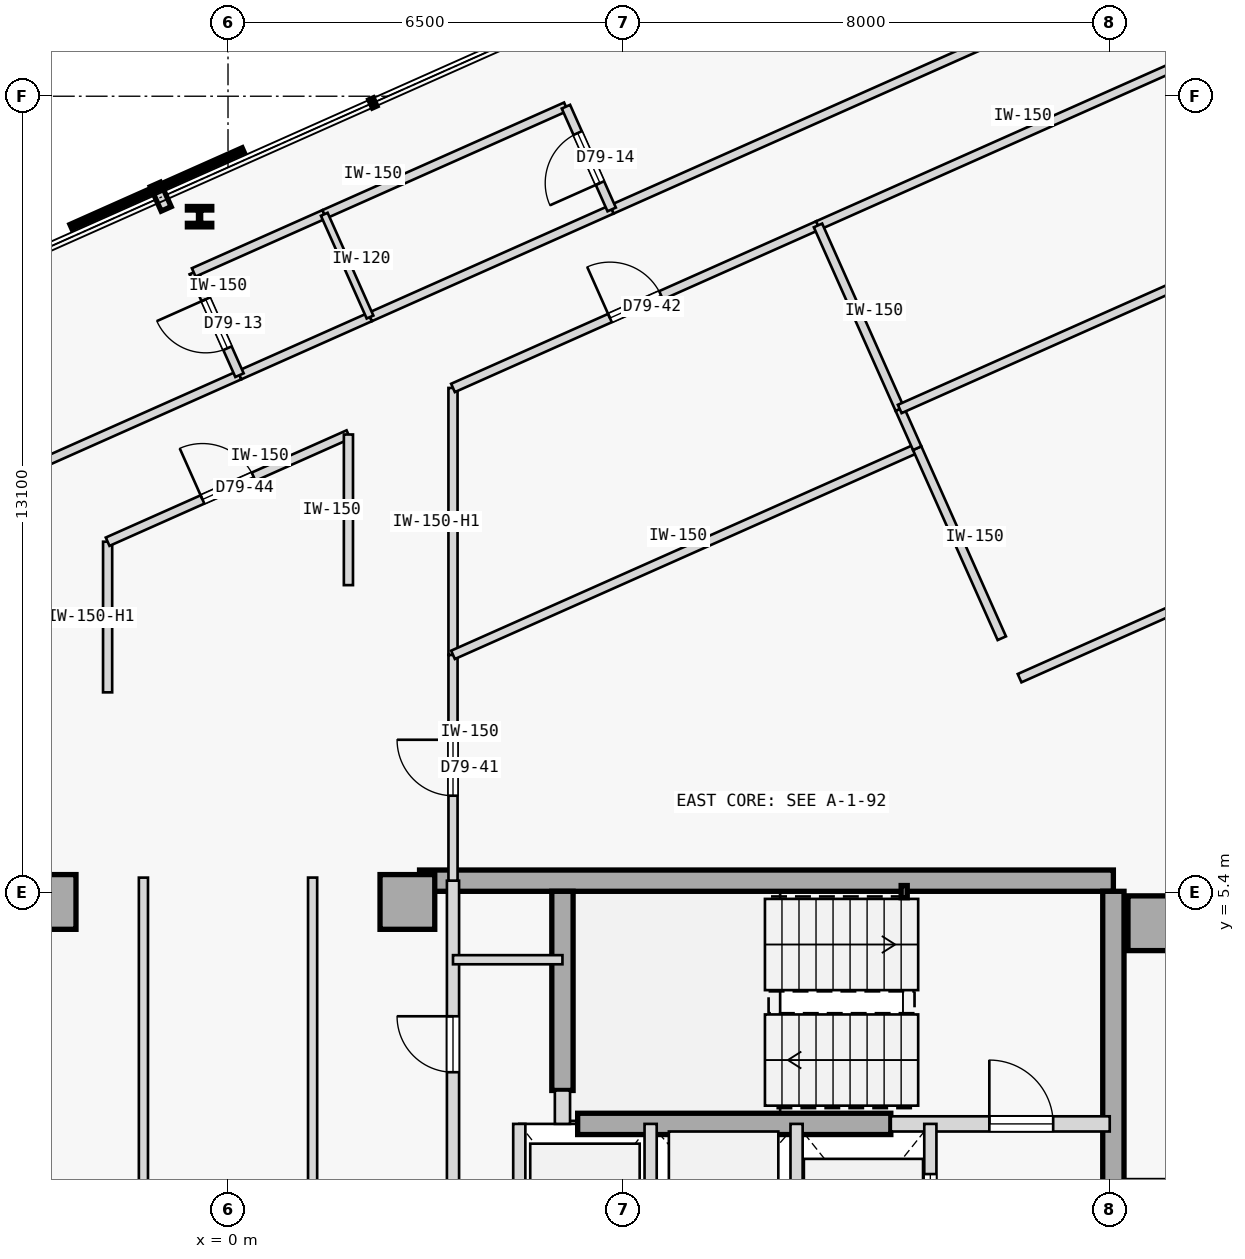
"""IFC4 building model, lengths in metres.
Left out: names, types, materials, properties, quantities, classifications, styles, units other than length and angle.
Written with IfcOpenShell. Run it as: python <this file> out.ifc"""

import sys

from ifc_helpers import new_model, si_unit, direction, frame, frame_2d, origin, origin_2d, place, context, subcontext, project, spatial, rectangle, hollow_rectangle, i_section, extrude, element, fill, save


model = new_model("IFC4")
c1 = context("Model", 3, precision=1e-05, world=origin(), true_north=direction((0.0, 1.0)))
c2 = subcontext(c1, "Body", "Model", "MODEL_VIEW")
j1 = project(units=[si_unit("LENGTHUNIT", "METRE"), si_unit("PLANEANGLEUNIT", "RADIAN")], contexts=[c1])
p1 = place(None, origin())
s1 = spatial("IfcSite", under=j1, at=p1, CompositionType="ELEMENT")
p2 = place(p1, origin())
s2 = spatial("IfcBuilding", under=s1, at=p2, CompositionType="ELEMENT")
p3 = place(p2, frame((0.0, 0.0, 295.3)))
s3 = spatial("IfcBuildingStorey", under=s2, at=p3, CompositionType="ELEMENT", Elevation=295.3)
for number, where, z_axis, x_axis in (
    (1, (-2.95, 5.25, 0.0), (0.0, 0.0, 1.0), (1.0, 0.0, 0.0)),
    (2, (15.25, 4.9, 0.0), (0.0, 0.0, 1.0), (1.0, 0.0, 0.0)),
    (3, (2.95, 5.25, 0.0), (0.0, 0.0, 1.0), (1.0, 0.0, 0.0)),
):
    element("IfcColumn", number, at=place(p3, frame(where, z_axis=z_axis, x_axis=x_axis)), inside=s3, PredefinedType="COLUMN", context=c2, shape_type="SweptSolid", body=[
        extrude(rectangle(XDim=0.9, YDim=0.9, at=origin_2d()), origin(), (0.0, 0.0, 1.0), 3.35),
    ])
p4 = place(p3, frame((3.15, 5.6, 0.0), z_axis=(0.0, 0.0, 1.0), x_axis=(1.0, 0.0, 0.0)))
e4 = element("IfcWall", 4, at=p4, inside=s3, PredefinedType="SHEAR", context=c2, shape_type="SweptSolid", body=[
    extrude(rectangle(XDim=11.41, YDim=0.35, at=frame_2d((5.705, 0.0))), origin(), (0.0, 0.0, 1.0), 3.125),
])
p5 = place(p3, frame((14.56, -5.425, 0.0), z_axis=(0.0, 0.0, 1.0), x_axis=(0.0, 1.0, 0.0)))
e5 = element("IfcWall", 5, at=p5, inside=s3, PredefinedType="SHEAR", context=c2, shape_type="SweptSolid", body=[
    extrude(rectangle(XDim=10.85, YDim=0.35, at=frame_2d((5.425, 0.0))), origin(), (0.0, 0.0, 1.0), 3.125),
])
p6 = place(p3, frame((5.5, 2.15, 0.0), z_axis=(0.0, 0.0, 1.0), x_axis=(0.0, 1.0, 0.0)))
e6 = element("IfcWall", 6, at=p6, inside=s3, PredefinedType="SHEAR", context=c2, shape_type="SweptSolid", body=[
    extrude(rectangle(XDim=3.275, YDim=0.35, at=frame_2d((1.638, 0.0))), origin(), (0.0, 0.0, 1.0), 3.125),
])
p7 = place(p3, frame((5.75, 1.6, 0.0), z_axis=(0.0, 0.0, 1.0), x_axis=(1.0, 0.0, 0.0)))
e7 = element("IfcWall", 7, at=p7, inside=s3, PredefinedType="SHEAR", context=c2, shape_type="SweptSolid", body=[
    extrude(rectangle(XDim=5.15, YDim=0.35, at=frame_2d((2.575, 0.0))), origin(), (0.0, 0.0, 1.0), 3.125),
])
p8 = place(p3, frame((11.12, 5.42, 0.0), z_axis=(0.0, 0.0, 1.0), x_axis=(1.0, 0.0, 0.0)))
e8 = element("IfcColumn", 8, at=p8, inside=s3, PredefinedType="COLUMN", context=c2, shape_type="SweptSolid", body=[
    extrude(hollow_rectangle(XDim=0.1, YDim=0.2, WallThickness=0.008, at=origin_2d()), origin(), (0.0, 0.0, 1.0), 3.35),
])
p9 = place(p3, frame((-0.468, 16.519, 0.0), z_axis=(0.0, 0.0, 1.0), x_axis=(1.0, 0.0, 0.0)))
e9 = element("IfcColumn", 9, at=p9, inside=s3, PredefinedType="COLUMN", context=c2, shape_type="SweptSolid", body=[
    extrude(i_section(OverallWidth=0.401, OverallDepth=0.335, WebThickness=0.036, FlangeThickness=0.058, FilletRadius=0.015, at=origin_2d()), origin(), (0.0, 0.0, 1.0), 3.35),
])
p10 = place(p3, frame((10.9, 1.6, 0.0), z_axis=(0.0, 0.0, 1.0), x_axis=(1.0, 0.0, 0.0)))
e10 = element("IfcWall", 10, at=p10, inside=s3, PredefinedType="STANDARD", context=c2, shape_type="SweptSolid", body=[
    extrude(rectangle(XDim=3.6, YDim=0.25, at=frame_2d((1.8, 0.0))), origin(), (0.0, 0.0, 1.0), 3.125),
])
p11 = place(p10, frame((1.62, 0.0, 0.0)))
e11 = element("IfcOpeningElement", 11, at=p11, cuts=e10, PredefinedType="OPENING", context=c2, shape_type="SweptSolid", body=[
    extrude(rectangle(XDim=1.05, YDim=2.15, at=frame_2d((0.525, 1.075))), frame((0.0, 0.135, 0.0), z_axis=(0.0, -1.0, 0.0), x_axis=(1.0, 0.0, 0.0)), (0.0, 0.0, 1.0), 0.27),
])
p12 = place(p3, frame((5.5, 1.6, 0.0), z_axis=(0.0, 0.0, 1.0), x_axis=(0.0, 1.0, 0.0)))
e12 = element("IfcWall", 12, at=p12, inside=s3, PredefinedType="STANDARD", context=c2, shape_type="SweptSolid", body=[
    extrude(rectangle(XDim=0.55, YDim=0.25, at=frame_2d((0.275, 0.0))), origin(), (0.0, 0.0, 1.0), 3.125),
])
p13 = place(p3, frame((3.7, -1.15, 0.0), z_axis=(0.0, 0.0, 1.0), x_axis=(0.0, 1.0, 0.0)))
e13 = element("IfcWall", 13, at=p13, inside=s3, PredefinedType="STANDARD", context=c2, shape_type="SweptSolid", body=[
    extrude(rectangle(XDim=6.75, YDim=0.2, at=frame_2d((3.375, 0.0))), origin(), (0.0, 0.0, 1.0), 3.125),
])
p14 = place(p13, frame((3.6, 0.0, 0.0)))
e14 = element("IfcOpeningElement", 14, at=p14, cuts=e13, PredefinedType="OPENING", context=c2, shape_type="SweptSolid", body=[
    extrude(rectangle(XDim=0.92, YDim=2.15, at=frame_2d((0.46, 1.075))), frame((0.0, 0.11, 0.0), z_axis=(0.0, -1.0, 0.0), x_axis=(1.0, 0.0, 0.0)), (0.0, 0.0, 1.0), 0.22),
])
p15 = place(p3, frame((11.55, -1.15, 0.0), z_axis=(0.0, 0.0, 1.0), x_axis=(0.0, 1.0, 0.0)))
e15 = element("IfcWall", 15, at=p15, inside=s3, PredefinedType="STANDARD", context=c2, shape_type="SweptSolid", body=[
    extrude(rectangle(XDim=2.75, YDim=0.2, at=frame_2d((1.375, 0.0))), origin(), (0.0, 0.0, 1.0), 3.125),
])
p16 = place(p15, frame((0.825, 0.0, 0.0)))
e16 = element("IfcOpeningElement", 16, at=p16, cuts=e15, PredefinedType="OPENING", context=c2, shape_type="SweptSolid", body=[
    extrude(rectangle(XDim=1.1, YDim=2.15, at=frame_2d((0.55, 1.075))), frame((0.0, 0.11, 0.0), z_axis=(0.0, -1.0, 0.0), x_axis=(1.0, 0.0, 0.0)), (0.0, 0.0, 1.0), 0.22),
])
for number, where, z_axis, x_axis in (
    (17, (9.35, -1.15, 0.0), (0.0, 0.0, 1.0), (0.0, 1.0, 0.0)),
    (18, (6.95, -1.15, 0.0), (0.0, 0.0, 1.0), (0.0, 1.0, 0.0)),
    (19, (4.79, -1.15, 0.0), (0.0, 0.0, 1.0), (0.0, 1.0, 0.0)),
):
    element("IfcWall", number, at=place(p3, frame(where, z_axis=z_axis, x_axis=x_axis)), inside=s3, PredefinedType="STANDARD", context=c2, shape_type="SweptSolid", body=[
        extrude(rectangle(XDim=2.75, YDim=0.2, at=frame_2d((1.375, 0.0))), origin(), (0.0, 0.0, 1.0), 3.125),
    ])
p17 = place(p3, frame((3.7, 4.3, 0.0), z_axis=(0.0, 0.0, 1.0), x_axis=(1.0, 0.0, 0.0)))
e20 = element("IfcWall", 20, at=p17, inside=s3, PredefinedType="PARTITIONING", context=c2, shape_type="SweptSolid", body=[
    extrude(rectangle(XDim=1.8, YDim=0.15, at=frame_2d((0.9, 0.0))), origin(), (0.0, 0.0, 1.0), 3.125),
])
p18 = place(p3, frame((-1.391, -5.65, 0.0), z_axis=(0.0, 0.0, 1.0), x_axis=(-2.1605738e-05, 0.999999999767, 0.0)))
e21 = element("IfcWall", 21, at=p18, inside=s3, PredefinedType="PARTITIONING", context=c2, shape_type="SweptSolid", body=[
    extrude(rectangle(XDim=11.3, YDim=0.15, at=frame_2d((5.65, 0.0))), origin(), (0.0, 0.0, 1.0), 3.125),
])
p19 = place(p3, frame((1.391, -5.65, 0.0), z_axis=(0.0, 0.0, 1.0), x_axis=(4.3206809e-05, 0.999999999067, 0.0)))
e22 = element("IfcWall", 22, at=p19, inside=s3, PredefinedType="PARTITIONING", context=c2, shape_type="SweptSolid", body=[
    extrude(rectangle(XDim=11.301, YDim=0.15, at=frame_2d((5.65, 0.0))), origin(), (0.0, 0.0, 1.0), 3.125),
])
p20 = place(p19, frame((5.176, 0.0, 0.0)))
e23 = element("IfcOpeningElement", 23, at=p20, cuts=e22, PredefinedType="OPENING", context=c2, shape_type="SweptSolid", body=[
    extrude(rectangle(XDim=0.95, YDim=2.15, at=frame_2d((0.475, 1.075))), frame((0.0, 0.085, 0.0), z_axis=(0.0, -1.0, 0.0), x_axis=(1.0, 0.0, 0.0)), (0.0, 0.0, 1.0), 0.17),
])
p21 = place(p3, frame((-5.935, 11.187, 0.0), z_axis=(0.0, 0.0, 1.0), x_axis=(0.91354851465, 0.406729776856, 0.0)))
e24 = element("IfcWall", 24, at=p21, inside=s3, PredefinedType="PARTITIONING", context=c2, shape_type="SweptSolid", body=[
    extrude(rectangle(XDim=6.703, YDim=0.15, at=frame_2d((3.352, 0.0))), origin(), (0.0, 0.0, 1.0), 3.125),
])
p22 = place(p3, frame((6.31, 16.638, 0.0), z_axis=(0.0, 0.0, 1.0), x_axis=(0.913550659227, 0.406724959925, 0.0)))
e25 = element("IfcWall", 25, at=p22, inside=s3, PredefinedType="PARTITIONING", context=c2, shape_type="SweptSolid", body=[
    extrude(rectangle(XDim=17.185, YDim=0.15, at=frame_2d((8.592, 0.0))), origin(), (0.0, 0.0, 1.0), 3.125),
])
p23 = place(p22, frame((8.117, 0.0, 0.0)))
e26 = element("IfcOpeningElement", 26, at=p23, cuts=e25, PredefinedType="OPENING", context=c2, shape_type="SweptSolid", body=[
    extrude(rectangle(XDim=0.95, YDim=2.15, at=frame_2d((0.475, 1.075))), frame((0.0, 0.085, 0.0), z_axis=(0.0, -1.0, 0.0), x_axis=(1.0, 0.0, 0.0)), (0.0, 0.0, 1.0), 0.17),
])
p24 = place(p3, frame((0.189, 13.913, 0.0), z_axis=(0.0, 0.0, 1.0), x_axis=(0.913520021435, 0.406793768926, 0.0)))
e27 = element("IfcWall", 27, at=p24, inside=s3, PredefinedType="PARTITIONING", context=c2, shape_type="SweptSolid", body=[
    extrude(rectangle(XDim=2.35, YDim=0.15, at=frame_2d((1.175, 0.0))), origin(), (0.0, 0.0, 1.0), 3.125),
])
p25 = place(p3, frame((2.336, 14.869, 0.0), z_axis=(0.0, 0.0, 1.0), x_axis=(0.913545193015, 0.406737237438, 0.0)))
e28 = element("IfcWall", 28, at=p25, inside=s3, PredefinedType="PARTITIONING", context=c2, shape_type="SweptSolid", body=[
    extrude(rectangle(XDim=4.35, YDim=0.15, at=frame_2d((2.175, 0.0))), origin(), (0.0, 0.0, 1.0), 3.125),
])
p26 = place(p3, frame((3.7, 5.601, 0.0), z_axis=(0.0, 0.0, 1.0), x_axis=(0.0, 1.0, 0.0)))
e29 = element("IfcWall", 29, at=p26, inside=s3, PredefinedType="PARTITIONING", context=c2, shape_type="SweptSolid", body=[
    extrude(rectangle(XDim=3.713, YDim=0.15, at=frame_2d((1.856, 0.0))), origin(), (0.0, 0.0, 1.0), 3.125),
])
p27 = place(p26, frame((1.396, 0.0, 0.0)))
e30 = element("IfcOpeningElement", 30, at=p27, cuts=e29, PredefinedType="OPENING", context=c2, shape_type="SweptSolid", body=[
    extrude(rectangle(XDim=0.92, YDim=2.15, at=frame_2d((0.46, 1.075))), frame((0.0, 0.085, 0.0), z_axis=(0.0, -1.0, 0.0), x_axis=(1.0, 0.0, 0.0)), (0.0, 0.0, 1.0), 0.17),
])
p28 = place(p3, frame((3.7, 9.313, 0.0), z_axis=(0.0, 0.0, 1.0), x_axis=(-0.000111240891, 0.999999993813, 0.0)))
e31 = element("IfcWall", 31, at=p28, inside=s3, PredefinedType="PARTITIONING", context=c2, shape_type="SweptSolid", body=[
    extrude(rectangle(XDim=4.389, YDim=0.15, at=frame_2d((2.195, 0.0))), origin(), (0.0, 0.0, 1.0), 2.675),
])
p29 = place(p3, frame((3.7, 13.703, 0.0), z_axis=(0.0, 0.0, 1.0), x_axis=(0.913549363376, 0.406727870542, 0.0)))
e32 = element("IfcWall", 32, at=p29, inside=s3, PredefinedType="PARTITIONING", context=c2, shape_type="SweptSolid", body=[
    extrude(rectangle(XDim=6.571, YDim=0.15, at=frame_2d((3.286, 0.0))), origin(), (0.0, 0.0, 1.0), 3.125),
])
p30 = place(p29, frame((2.825, 0.0, 0.0)))
e33 = element("IfcOpeningElement", 33, at=p30, cuts=e32, PredefinedType="OPENING", context=c2, shape_type="SweptSolid", body=[
    extrude(rectangle(XDim=0.92, YDim=2.15, at=frame_2d((0.46, 1.075))), frame((0.0, 0.085, 0.0), z_axis=(0.0, -1.0, 0.0), x_axis=(1.0, 0.0, 0.0)), (0.0, 0.0, 1.0), 0.17),
])
p31 = place(p3, frame((-1.98, 8.697, 0.0), z_axis=(0.0, 0.0, 1.0), x_axis=(0.000197102588, 0.999999980575, 0.0)))
e34 = element("IfcWall", 34, at=p31, inside=s3, PredefinedType="PARTITIONING", context=c2, shape_type="SweptSolid", body=[
    extrude(rectangle(XDim=2.477, YDim=0.15, at=frame_2d((1.239, 0.0))), origin(), (0.0, 0.0, 1.0), 2.675),
])
p32 = place(p3, frame((-1.98, 11.174, 0.0), z_axis=(0.0, 0.0, 1.0), x_axis=(0.913546598225, 0.406734081276, 0.0)))
e35 = element("IfcWall", 35, at=p32, inside=s3, PredefinedType="PARTITIONING", context=c2, shape_type="SweptSolid", body=[
    extrude(rectangle(XDim=4.335, YDim=0.15, at=frame_2d((2.167, 0.0))), origin(), (0.0, 0.0, 1.0), 3.125),
])
p33 = place(p32, frame((1.708, 0.0, 0.0)))
e36 = element("IfcOpeningElement", 36, at=p33, cuts=e35, PredefinedType="OPENING", context=c2, shape_type="SweptSolid", body=[
    extrude(rectangle(XDim=0.92, YDim=2.15, at=frame_2d((0.46, 1.075))), frame((0.0, 0.085, 0.0), z_axis=(0.0, -1.0, 0.0), x_axis=(1.0, 0.0, 0.0)), (0.0, 0.0, 1.0), 0.17),
])
p34 = place(p3, frame((1.98, 10.46, 0.0), z_axis=(0.0, 0.0, 1.0), x_axis=(0.000197102588, 0.999999980575, 0.0)))
e37 = element("IfcWall", 37, at=p34, inside=s3, PredefinedType="PARTITIONING", context=c2, shape_type="SweptSolid", body=[
    extrude(rectangle(XDim=2.477, YDim=0.15, at=frame_2d((1.239, 0.0))), origin(), (0.0, 0.0, 1.0), 3.125),
])
p35 = place(p3, frame((9.703, 16.375, 0.0), z_axis=(0.0, 0.0, 1.0), x_axis=(0.913544622417, 0.406738519018, 0.0)))
e38 = element("IfcWall", 38, at=p35, inside=s3, PredefinedType="PARTITIONING", context=c2, shape_type="SweptSolid", body=[
    extrude(rectangle(XDim=14.192, YDim=0.15, at=frame_2d((7.096, 0.0))), origin(), (0.0, 0.0, 1.0), 3.125),
])
p36 = place(p35, frame((6.636, 0.0, 0.0)))
e39 = element("IfcOpeningElement", 39, at=p36, cuts=e38, PredefinedType="OPENING", context=c2, shape_type="SweptSolid", body=[
    extrude(rectangle(XDim=0.92, YDim=2.15, at=frame_2d((0.46, 1.075))), frame((0.0, 0.085, 0.0), z_axis=(0.0, -1.0, 0.0), x_axis=(1.0, 0.0, 0.0)), (0.0, 0.0, 1.0), 0.17),
])
p37 = place(p3, frame((0.189, 13.913, 0.0), z_axis=(0.0, 0.0, 1.0), x_axis=(-0.406701600856, 0.913561058639, 0.0)))
e40 = element("IfcWall", 40, at=p37, inside=s3, PredefinedType="PARTITIONING", context=c2, shape_type="SweptSolid", body=[
    extrude(rectangle(XDim=1.85, YDim=0.15, at=frame_2d((0.925, 0.0))), origin(), (0.0, 0.0, 1.0), 3.125),
])
p38 = place(p37, frame((0.485, 0.0, 0.0)))
e41 = element("IfcOpeningElement", 41, at=p38, cuts=e40, PredefinedType="OPENING", context=c2, shape_type="SweptSolid", body=[
    extrude(rectangle(XDim=0.88, YDim=2.15, at=frame_2d((0.44, 1.075))), frame((0.0, 0.085, 0.0), z_axis=(0.0, -1.0, 0.0), x_axis=(1.0, 0.0, 0.0)), (0.0, 0.0, 1.0), 0.17),
])
p39 = place(p3, frame((-0.564, 15.603, 0.0), z_axis=(0.0, 0.0, 1.0), x_axis=(0.913541436194, 0.406745675276, 0.0)))
e42 = element("IfcWall", 42, at=p39, inside=s3, PredefinedType="PARTITIONING", context=c2, shape_type="SweptSolid", body=[
    extrude(rectangle(XDim=2.35, YDim=0.15, at=frame_2d((1.175, 0.0))), origin(), (0.0, 0.0, 1.0), 3.125),
])
p40 = place(p3, frame((1.583, 16.559, 0.0), z_axis=(0.0, 0.0, 1.0), x_axis=(0.913554477336, 0.406716383908, 0.0)))
e43 = element("IfcWall", 43, at=p40, inside=s3, PredefinedType="PARTITIONING", context=c2, shape_type="SweptSolid", body=[
    extrude(rectangle(XDim=4.35, YDim=0.15, at=frame_2d((2.175, 0.0))), origin(), (0.0, 0.0, 1.0), 3.125),
])
p41 = place(p3, frame((6.31, 16.638, 0.0), z_axis=(0.0, 0.0, 1.0), x_axis=(-0.406750635596, 0.913539227643, 0.0)))
e44 = element("IfcWall", 44, at=p41, inside=s3, PredefinedType="PARTITIONING", context=c2, shape_type="SweptSolid", body=[
    extrude(rectangle(XDim=1.85, YDim=0.15, at=frame_2d((0.925, 0.0))), origin(), (0.0, 0.0, 1.0), 3.125),
])
p42 = place(p41, frame((0.475, 0.0, 0.0)))
e45 = element("IfcOpeningElement", 45, at=p42, cuts=e44, PredefinedType="OPENING", context=c2, shape_type="SweptSolid", body=[
    extrude(rectangle(XDim=0.9, YDim=2.15, at=frame_2d((0.45, 1.075))), frame((0.0, 0.085, 0.0), z_axis=(0.0, -1.0, 0.0), x_axis=(1.0, 0.0, 0.0)), (0.0, 0.0, 1.0), 0.17),
])
p43 = place(p3, frame((2.336, 14.869, 0.0), z_axis=(0.0, 0.0, 1.0), x_axis=(-0.406860767979, 0.913490183571, 0.0)))
e46 = element("IfcWall", 46, at=p43, inside=s3, PredefinedType="PARTITIONING", context=c2, shape_type="SweptSolid", body=[
    extrude(rectangle(XDim=1.85, YDim=0.12, at=frame_2d((0.925, 0.0))), origin(), (0.0, 0.0, 1.0), 3.125),
])
p44 = place(p3, frame((3.7, 9.313, 0.0), z_axis=(0.0, 0.0, 1.0), x_axis=(0.913545080962, 0.406737489112, 0.0)))
e47 = element("IfcWall", 47, at=p44, inside=s3, PredefinedType="PARTITIONING", context=c2, shape_type="SweptSolid", body=[
    extrude(rectangle(XDim=8.356, YDim=0.15, at=frame_2d((4.178, 0.0))), origin(), (0.0, 0.0, 1.0), 3.125),
])
p45 = place(p3, frame((12.725, 9.587, 0.0), z_axis=(0.0, 0.0, 1.0), x_axis=(-0.406714462948, 0.913555332549, 0.0)))
e48 = element("IfcWall", 48, at=p45, inside=s3, PredefinedType="PARTITIONING", context=c2, shape_type="SweptSolid", body=[
    extrude(rectangle(XDim=3.421, YDim=0.15, at=frame_2d((1.71, 0.0))), origin(), (0.0, 0.0, 1.0), 3.125),
])
p46 = place(p3, frame((11.334, 12.712, 0.0), z_axis=(0.0, 0.0, 1.0), x_axis=(-0.40694029237, 0.913454759934, 0.0)))
e49 = element("IfcWall", 49, at=p46, inside=s3, PredefinedType="PARTITIONING", context=c2, shape_type="SweptSolid", body=[
    extrude(rectangle(XDim=0.706, YDim=0.15, at=frame_2d((0.353, 0.0))), origin(), (0.0, 0.0, 1.0), 3.125),
])
p47 = place(p3, frame((11.046, 13.357, 0.0), z_axis=(0.0, 0.0, 1.0), x_axis=(-0.406714303965, 0.913555403328, 0.0)))
e50 = element("IfcWall", 50, at=p47, inside=s3, PredefinedType="PARTITIONING", context=c2, shape_type="SweptSolid", body=[
    extrude(rectangle(XDim=3.304, YDim=0.15, at=frame_2d((1.652, 0.0))), origin(), (0.0, 0.0, 1.0), 3.125),
])
p48 = place(p3, frame((13.018, 8.93, 0.0), z_axis=(0.0, 0.0, 1.0), x_axis=(0.913551014388, 0.406724162191, 0.0)))
e51 = element("IfcWall", 51, at=p48, inside=s3, PredefinedType="PARTITIONING", context=c2, shape_type="SweptSolid", body=[
    extrude(rectangle(XDim=14.192, YDim=0.15, at=frame_2d((7.096, 0.0))), origin(), (0.0, 0.0, 1.0), 3.125),
])
p49 = place(p48, frame((6.636, 0.0, 0.0)))
e52 = element("IfcOpeningElement", 52, at=p49, cuts=e51, PredefinedType="OPENING", context=c2, shape_type="SweptSolid", body=[
    extrude(rectangle(XDim=0.92, YDim=2.15, at=frame_2d((0.46, 1.075))), frame((0.0, 0.085, 0.0), z_axis=(0.0, -1.0, 0.0), x_axis=(1.0, 0.0, 0.0)), (0.0, 0.0, 1.0), 0.17),
])
p50 = place(p3, frame((11.046, 13.357, 0.0), z_axis=(0.0, 0.0, 1.0), x_axis=(0.913553860075, 0.406717770379, 0.0)))
e53 = element("IfcWall", 53, at=p50, inside=s3, PredefinedType="PARTITIONING", context=c2, shape_type="SweptSolid", body=[
    extrude(rectangle(XDim=14.192, YDim=0.15, at=frame_2d((7.096, 0.0))), origin(), (0.0, 0.0, 1.0), 3.125),
])
p51 = place(p11, origin())
e54 = element("IfcDoor", 54, at=p51, inside=s3, OperationType="SINGLE_SWING_LEFT", PredefinedType="DOOR", context=c2, shape_type="SweptSolid", body=[
    extrude(rectangle(XDim=1.05, YDim=2.15, at=frame_2d((0.525, 1.075))), frame((0.0, 0.025, 0.0), z_axis=(0.0, -1.0, 0.0), x_axis=(1.0, 0.0, 0.0)), (0.0, 0.0, 1.0), 0.05),
])
fill(e11, e54)
p52 = place(p16, origin())
e55 = element("IfcDoor", 55, at=p52, inside=s3, OperationType="SLIDING_TO_RIGHT", PredefinedType="DOOR", context=c2, shape_type="SweptSolid", body=[
    extrude(rectangle(XDim=1.1, YDim=2.15, at=frame_2d((0.55, 1.075))), frame((0.0, 0.025, 0.0), z_axis=(0.0, -1.0, 0.0), x_axis=(1.0, 0.0, 0.0)), (0.0, 0.0, 1.0), 0.05),
])
fill(e16, e55)
p53 = place(p14, origin())
e56 = element("IfcDoor", 56, at=p53, inside=s3, OperationType="SINGLE_SWING_RIGHT", PredefinedType="DOOR", context=c2, shape_type="SweptSolid", body=[
    extrude(rectangle(XDim=0.92, YDim=2.15, at=frame_2d((0.46, 1.075))), frame((0.0, 0.025, 0.0), z_axis=(0.0, -1.0, 0.0), x_axis=(1.0, 0.0, 0.0)), (0.0, 0.0, 1.0), 0.05),
])
fill(e14, e56)
p54 = place(p38, origin())
e57 = element("IfcDoor", 57, at=p54, inside=s3, OperationType="SINGLE_SWING_RIGHT", PredefinedType="DOOR", context=c2, shape_type="SweptSolid", body=[
    extrude(rectangle(XDim=0.88, YDim=2.15, at=frame_2d((0.44, 1.075))), frame((0.0, 0.025, 0.0), z_axis=(0.0, -1.0, 0.0), x_axis=(1.0, 0.0, 0.0)), (0.0, 0.0, 1.0), 0.05),
])
fill(e41, e57)
p55 = place(p42, origin())
e58 = element("IfcDoor", 58, at=p55, inside=s3, OperationType="SINGLE_SWING_LEFT", PredefinedType="DOOR", context=c2, shape_type="SweptSolid", body=[
    extrude(rectangle(XDim=0.9, YDim=2.15, at=frame_2d((0.45, 1.075))), frame((0.0, 0.025, 0.0), z_axis=(0.0, -1.0, 0.0), x_axis=(1.0, 0.0, 0.0)), (0.0, 0.0, 1.0), 0.05),
])
fill(e45, e58)
p56 = place(p27, origin())
e59 = element("IfcDoor", 59, at=p56, inside=s3, OperationType="SINGLE_SWING_RIGHT", PredefinedType="DOOR", context=c2, shape_type="SweptSolid", body=[
    extrude(rectangle(XDim=0.92, YDim=2.15, at=frame_2d((0.46, 1.075))), frame((0.0, 0.025, 0.0), z_axis=(0.0, -1.0, 0.0), x_axis=(1.0, 0.0, 0.0)), (0.0, 0.0, 1.0), 0.05),
])
fill(e30, e59)
p57 = place(p30, origin())
e60 = element("IfcDoor", 60, at=p57, inside=s3, OperationType="SINGLE_SWING_LEFT", PredefinedType="DOOR", context=c2, shape_type="SweptSolid", body=[
    extrude(rectangle(XDim=0.92, YDim=2.15, at=frame_2d((0.46, 1.075))), frame((0.0, 0.025, 0.0), z_axis=(0.0, -1.0, 0.0), x_axis=(1.0, 0.0, 0.0)), (0.0, 0.0, 1.0), 0.05),
])
fill(e33, e60)
p58 = place(p33, origin())
e61 = element("IfcDoor", 61, at=p58, inside=s3, OperationType="SINGLE_SWING_LEFT", PredefinedType="DOOR", context=c2, shape_type="SweptSolid", body=[
    extrude(rectangle(XDim=0.92, YDim=2.15, at=frame_2d((0.46, 1.075))), frame((0.0, 0.025, 0.0), z_axis=(0.0, -1.0, 0.0), x_axis=(1.0, 0.0, 0.0)), (0.0, 0.0, 1.0), 0.05),
])
fill(e36, e61)
save(model, sys.argv[1])
